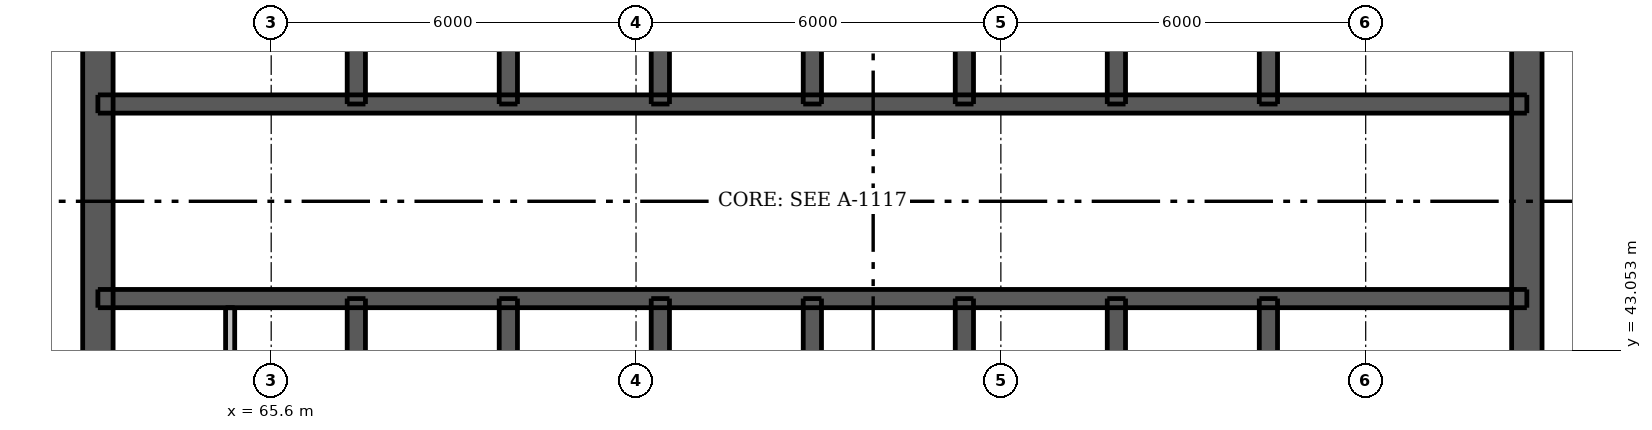
"""IFC4 building model, lengths in metres.
Left out: names, types, materials, properties, quantities, classifications, styles, units other than length and angle.
Written with IfcOpenShell. Run it as: python <this file> out.ifc"""

import sys

from ifc_helpers import new_model, si_unit, direction, frame, frame_2d, origin, place, context, subcontext, project, spatial, rectangle, extrude, element, fill, save


model = new_model("IFC4")
c1 = context("Model", 3, precision=1e-05, world=origin(), true_north=direction((0.0, 1.0)))
c2 = subcontext(c1, "Body", "Model", "MODEL_VIEW")
j1 = project(units=[si_unit("LENGTHUNIT", "METRE"), si_unit("PLANEANGLEUNIT", "RADIAN")], contexts=[c1])
p1 = place(None, origin())
s1 = spatial("IfcSite", under=j1, at=p1, CompositionType="ELEMENT")
p2 = place(p1, origin())
s2 = spatial("IfcBuilding", under=s1, at=p2, CompositionType="ELEMENT")
p3 = place(p2, frame((0.0, 0.0, 248.8)))
s3 = spatial("IfcBuildingStorey", under=s2, at=p3, CompositionType="ELEMENT", Elevation=248.8)
p4 = place(p3, frame((62.75, 33.5, 0.0), z_axis=(0.0, 0.0, 1.0), x_axis=(0.0, 1.0, 0.0)))
e1 = element("IfcWall", 1, at=p4, inside=s3, PredefinedType="SHEAR", context=c2, shape_type="SweptSolid", body=[
    extrude(rectangle(XDim=24.0, YDim=0.5, at=frame_2d((12.0, 0.0))), origin(), (0.0, 0.0, 1.0), 3.05),
])
p5 = place(p4, frame((11.2, 0.0, 0.0)))
e2 = element("IfcOpeningElement", 2, at=p5, cuts=e1, PredefinedType="OPENING", context=c2, shape_type="SweptSolid", body=[
    extrude(rectangle(XDim=1.6, YDim=2.1, at=frame_2d((0.8, 1.05))), frame((0.0, 0.26, 0.0), z_axis=(0.0, -1.0, 0.0), x_axis=(1.0, 0.0, 0.0)), (0.0, 0.0, 1.0), 0.52),
])
p6 = place(p3, frame((86.25, 33.5, 0.0), z_axis=(0.0, 0.0, 1.0), x_axis=(0.0, 1.0, 0.0)))
e3 = element("IfcWall", 3, at=p6, inside=s3, PredefinedType="SHEAR", context=c2, shape_type="SweptSolid", body=[
    extrude(rectangle(XDim=24.0, YDim=0.5, at=frame_2d((12.0, 0.0))), origin(), (0.0, 0.0, 1.0), 3.05),
])
p7 = place(p6, frame((11.2, 0.0, 0.0)))
e4 = element("IfcOpeningElement", 4, at=p7, cuts=e3, PredefinedType="OPENING", context=c2, shape_type="SweptSolid", body=[
    extrude(rectangle(XDim=1.6, YDim=2.1, at=frame_2d((0.8, 1.05))), frame((0.0, 0.26, 0.0), z_axis=(0.0, -1.0, 0.0), x_axis=(1.0, 0.0, 0.0)), (0.0, 0.0, 1.0), 0.52),
])
p8 = place(p3, frame((62.75, 43.9, 0.0), z_axis=(0.0, 0.0, 1.0), x_axis=(1.0, 0.0, 0.0)))
e5 = element("IfcWall", 5, at=p8, inside=s3, PredefinedType="SHEAR", context=c2, shape_type="SweptSolid", body=[
    extrude(rectangle(XDim=23.5, YDim=0.3, at=frame_2d((11.75, 0.0))), origin(), (0.0, 0.0, 1.0), 3.05),
])
p9 = place(p8, frame((0.762, 0.0, 0.0)))
e6 = element("IfcOpeningElement", 6, at=p9, cuts=e5, PredefinedType="OPENING", context=c2, shape_type="SweptSolid", body=[
    extrude(rectangle(XDim=0.9, YDim=2.1, at=frame_2d((0.45, 1.05))), frame((0.0, 0.16, 0.0), z_axis=(0.0, -1.0, 0.0), x_axis=(1.0, 0.0, 0.0)), (0.0, 0.0, 1.0), 0.32),
])
p10 = place(p8, frame((2.688, 0.0, 0.0)))
e7 = element("IfcOpeningElement", 7, at=p10, cuts=e5, PredefinedType="OPENING", context=c2, shape_type="SweptSolid", body=[
    extrude(rectangle(XDim=0.9, YDim=2.1, at=frame_2d((0.45, 1.05))), frame((0.0, 0.16, 0.0), z_axis=(0.0, -1.0, 0.0), x_axis=(1.0, 0.0, 0.0)), (0.0, 0.0, 1.0), 0.32),
])
p11 = place(p8, frame((20.875, 0.0, 0.0)))
e8 = element("IfcOpeningElement", 8, at=p11, cuts=e5, PredefinedType="OPENING", context=c2, shape_type="SweptSolid", body=[
    extrude(rectangle(XDim=0.9, YDim=2.1, at=frame_2d((0.45, 1.05))), frame((0.0, 0.16, 0.0), z_axis=(0.0, -1.0, 0.0), x_axis=(1.0, 0.0, 0.0)), (0.0, 0.0, 1.0), 0.32),
])
p12 = place(p8, frame((5.05, 0.0, 0.0)))
e9 = element("IfcOpeningElement", 9, at=p12, cuts=e5, PredefinedType="OPENING", context=c2, shape_type="SweptSolid", body=[
    extrude(rectangle(XDim=0.9, YDim=2.1, at=frame_2d((0.45, 1.05))), frame((0.0, 0.16, 0.0), z_axis=(0.0, -1.0, 0.0), x_axis=(1.0, 0.0, 0.0)), (0.0, 0.0, 1.0), 0.32),
])
p13 = place(p8, frame((7.55, 0.0, 0.0)))
e10 = element("IfcOpeningElement", 10, at=p13, cuts=e5, PredefinedType="OPENING", context=c2, shape_type="SweptSolid", body=[
    extrude(rectangle(XDim=0.9, YDim=2.1, at=frame_2d((0.45, 1.05))), frame((0.0, 0.16, 0.0), z_axis=(0.0, -1.0, 0.0), x_axis=(1.0, 0.0, 0.0)), (0.0, 0.0, 1.0), 0.32),
])
p14 = place(p8, frame((12.55, 0.0, 0.0)))
e11 = element("IfcOpeningElement", 11, at=p14, cuts=e5, PredefinedType="OPENING", context=c2, shape_type="SweptSolid", body=[
    extrude(rectangle(XDim=0.9, YDim=2.1, at=frame_2d((0.45, 1.05))), frame((0.0, 0.16, 0.0), z_axis=(0.0, -1.0, 0.0), x_axis=(1.0, 0.0, 0.0)), (0.0, 0.0, 1.0), 0.32),
])
p15 = place(p8, frame((15.05, 0.0, 0.0)))
e12 = element("IfcOpeningElement", 12, at=p15, cuts=e5, PredefinedType="OPENING", context=c2, shape_type="SweptSolid", body=[
    extrude(rectangle(XDim=0.9, YDim=2.1, at=frame_2d((0.45, 1.05))), frame((0.0, 0.16, 0.0), z_axis=(0.0, -1.0, 0.0), x_axis=(1.0, 0.0, 0.0)), (0.0, 0.0, 1.0), 0.32),
])
p16 = place(p3, frame((62.75, 47.1, 0.0), z_axis=(0.0, 0.0, 1.0), x_axis=(1.0, 0.0, 0.0)))
e13 = element("IfcWall", 13, at=p16, inside=s3, PredefinedType="SHEAR", context=c2, shape_type="SweptSolid", body=[
    extrude(rectangle(XDim=23.5, YDim=0.3, at=frame_2d((11.75, 0.0))), origin(), (0.0, 0.0, 1.0), 3.05),
])
p17 = place(p16, frame((1.725, 0.0, 0.0)))
e14 = element("IfcOpeningElement", 14, at=p17, cuts=e13, PredefinedType="OPENING", context=c2, shape_type="SweptSolid", body=[
    extrude(rectangle(XDim=0.9, YDim=2.1, at=frame_2d((0.45, 1.05))), frame((0.0, 0.16, 0.0), z_axis=(0.0, -1.0, 0.0), x_axis=(1.0, 0.0, 0.0)), (0.0, 0.0, 1.0), 0.32),
])
p18 = place(p16, frame((20.875, 0.0, 0.0)))
e15 = element("IfcOpeningElement", 15, at=p18, cuts=e13, PredefinedType="OPENING", context=c2, shape_type="SweptSolid", body=[
    extrude(rectangle(XDim=0.9, YDim=2.1, at=frame_2d((0.45, 1.05))), frame((0.0, 0.16, 0.0), z_axis=(0.0, -1.0, 0.0), x_axis=(1.0, 0.0, 0.0)), (0.0, 0.0, 1.0), 0.32),
])
p19 = place(p16, frame((4.95, 0.0, 0.0)))
e16 = element("IfcOpeningElement", 16, at=p19, cuts=e13, PredefinedType="OPENING", context=c2, shape_type="SweptSolid", body=[
    extrude(rectangle(XDim=1.1, YDim=2.1, at=frame_2d((0.55, 1.05))), frame((0.0, 0.16, 0.0), z_axis=(0.0, -1.0, 0.0), x_axis=(1.0, 0.0, 0.0)), (0.0, 0.0, 1.0), 0.32),
])
p20 = place(p16, frame((7.45, 0.0, 0.0)))
e17 = element("IfcOpeningElement", 17, at=p20, cuts=e13, PredefinedType="OPENING", context=c2, shape_type="SweptSolid", body=[
    extrude(rectangle(XDim=1.1, YDim=2.1, at=frame_2d((0.55, 1.05))), frame((0.0, 0.16, 0.0), z_axis=(0.0, -1.0, 0.0), x_axis=(1.0, 0.0, 0.0)), (0.0, 0.0, 1.0), 0.32),
])
p21 = place(p16, frame((9.95, 0.0, 0.0)))
e18 = element("IfcOpeningElement", 18, at=p21, cuts=e13, PredefinedType="OPENING", context=c2, shape_type="SweptSolid", body=[
    extrude(rectangle(XDim=1.1, YDim=2.1, at=frame_2d((0.55, 1.05))), frame((0.0, 0.16, 0.0), z_axis=(0.0, -1.0, 0.0), x_axis=(1.0, 0.0, 0.0)), (0.0, 0.0, 1.0), 0.32),
])
p22 = place(p16, frame((12.45, 0.0, 0.0)))
e19 = element("IfcOpeningElement", 19, at=p22, cuts=e13, PredefinedType="OPENING", context=c2, shape_type="SweptSolid", body=[
    extrude(rectangle(XDim=1.1, YDim=2.1, at=frame_2d((0.55, 1.05))), frame((0.0, 0.16, 0.0), z_axis=(0.0, -1.0, 0.0), x_axis=(1.0, 0.0, 0.0)), (0.0, 0.0, 1.0), 0.32),
])
p23 = place(p16, frame((14.95, 0.0, 0.0)))
e20 = element("IfcOpeningElement", 20, at=p23, cuts=e13, PredefinedType="OPENING", context=c2, shape_type="SweptSolid", body=[
    extrude(rectangle(XDim=1.1, YDim=2.1, at=frame_2d((0.55, 1.05))), frame((0.0, 0.16, 0.0), z_axis=(0.0, -1.0, 0.0), x_axis=(1.0, 0.0, 0.0)), (0.0, 0.0, 1.0), 0.32),
])
p24 = place(p16, frame((17.45, 0.0, 0.0)))
e21 = element("IfcOpeningElement", 21, at=p24, cuts=e13, PredefinedType="OPENING", context=c2, shape_type="SweptSolid", body=[
    extrude(rectangle(XDim=1.1, YDim=2.1, at=frame_2d((0.55, 1.05))), frame((0.0, 0.16, 0.0), z_axis=(0.0, -1.0, 0.0), x_axis=(1.0, 0.0, 0.0)), (0.0, 0.0, 1.0), 0.32),
])
p25 = place(p3, frame((67.0, 33.75, 0.0), z_axis=(0.0, 0.0, 1.0), x_axis=(0.0, 1.0, 0.0)))
e22 = element("IfcWall", 22, at=p25, inside=s3, PredefinedType="SHEAR", context=c2, shape_type="SweptSolid", body=[
    extrude(rectangle(XDim=10.15, YDim=0.3, at=frame_2d((5.075, 0.0))), origin(), (0.0, 0.0, 1.0), 3.05),
])
p26 = place(p25, frame((0.45, 0.0, 0.0)))
e23 = element("IfcOpeningElement", 23, at=p26, cuts=e22, PredefinedType="OPENING", context=c2, shape_type="SweptSolid", body=[
    extrude(rectangle(XDim=1.1, YDim=2.1, at=frame_2d((0.55, 1.05))), frame((0.0, 0.16, 0.0), z_axis=(0.0, -1.0, 0.0), x_axis=(1.0, 0.0, 0.0)), (0.0, 0.0, 1.0), 0.32),
])
for number, where, z_axis, x_axis in (
    (24, (67.0, 47.1, 0.0), (0.0, 0.0, 1.0), (0.0, 1.0, 0.0)),
    (25, (82.0, 33.75, 0.0), (0.0, 0.0, 1.0), (0.0, 1.0, 0.0)),
    (26, (82.0, 47.1, 0.0), (0.0, 0.0, 1.0), (0.0, 1.0, 0.0)),
):
    element("IfcWall", number, at=place(p3, frame(where, z_axis=z_axis, x_axis=x_axis)), inside=s3, PredefinedType="SHEAR", context=c2, shape_type="SweptSolid", body=[
        extrude(rectangle(XDim=10.15, YDim=0.3, at=frame_2d((5.075, 0.0))), origin(), (0.0, 0.0, 1.0), 3.05),
    ])
for number, where, z_axis, x_axis in (
    (27, (69.5, 41.0, 0.0), (0.0, 0.0, 1.0), (0.0, 1.0, 0.0)),
    (28, (69.5, 47.1, 0.0), (0.0, 0.0, 1.0), (0.0, 1.0, 0.0)),
    (29, (72.0, 41.0, 0.0), (0.0, 0.0, 1.0), (0.0, 1.0, 0.0)),
    (30, (72.0, 47.1, 0.0), (0.0, 0.0, 1.0), (0.0, 1.0, 0.0)),
    (31, (74.5, 41.0, 0.0), (0.0, 0.0, 1.0), (0.0, 1.0, 0.0)),
    (32, (74.5, 47.1, 0.0), (0.0, 0.0, 1.0), (0.0, 1.0, 0.0)),
    (33, (77.0, 41.0, 0.0), (0.0, 0.0, 1.0), (0.0, 1.0, 0.0)),
    (34, (77.0, 47.1, 0.0), (0.0, 0.0, 1.0), (0.0, 1.0, 0.0)),
    (35, (79.5, 41.0, 0.0), (0.0, 0.0, 1.0), (0.0, 1.0, 0.0)),
    (36, (79.5, 47.1, 0.0), (0.0, 0.0, 1.0), (0.0, 1.0, 0.0)),
):
    element("IfcWall", number, at=place(p3, frame(where, z_axis=z_axis, x_axis=x_axis)), inside=s3, PredefinedType="SHEAR", context=c2, shape_type="SweptSolid", body=[
        extrude(rectangle(XDim=2.9, YDim=0.3, at=frame_2d((1.45, 0.0))), origin(), (0.0, 0.0, 1.0), 3.05),
    ])
p27 = place(p3, frame((64.925, 41.15, 0.0), z_axis=(0.0, 0.0, 1.0), x_axis=(0.0, 1.0, 0.0)))
e37 = element("IfcWall", 37, at=p27, inside=s3, PredefinedType="PLUMBINGWALL", context=c2, shape_type="SweptSolid", body=[
    extrude(rectangle(XDim=2.6, YDim=0.15, at=frame_2d((1.3, 0.0))), origin(), (0.0, 0.0, 1.0), 3.05),
])
p28 = place(p5, origin())
e38 = element("IfcDoor", 38, at=p28, inside=s3, OperationType="DOUBLE_DOOR_SINGLE_SWING", PredefinedType="DOOR", context=c2, shape_type="SweptSolid", body=[
    extrude(rectangle(XDim=1.6, YDim=2.1, at=frame_2d((0.8, 1.05))), frame((0.0, -0.188, 0.0), z_axis=(0.0, -1.0, 0.0), x_axis=(1.0, 0.0, 0.0)), (0.0, 0.0, 1.0), 0.05),
])
fill(e2, e38)
p29 = place(p7, origin())
e39 = element("IfcDoor", 39, at=p29, inside=s3, OperationType="DOUBLE_DOOR_SINGLE_SWING", PredefinedType="DOOR", context=c2, shape_type="SweptSolid", body=[
    extrude(rectangle(XDim=1.6, YDim=2.1, at=frame_2d((0.8, 1.05))), frame((0.0, 0.237, 0.0), z_axis=(0.0, -1.0, 0.0), x_axis=(1.0, 0.0, 0.0)), (0.0, 0.0, 1.0), 0.05),
])
fill(e4, e39)
p30 = place(p9, origin())
e40 = element("IfcDoor", 40, at=p30, inside=s3, OperationType="SINGLE_SWING_LEFT", PredefinedType="DOOR", context=c2, shape_type="SweptSolid", body=[
    extrude(rectangle(XDim=0.9, YDim=2.1, at=frame_2d((0.45, 1.05))), frame((0.0, -0.087, 0.0), z_axis=(0.0, -1.0, 0.0), x_axis=(1.0, 0.0, 0.0)), (0.0, 0.0, 1.0), 0.05),
])
fill(e6, e40)
p31 = place(p10, origin())
e41 = element("IfcDoor", 41, at=p31, inside=s3, OperationType="SINGLE_SWING_RIGHT", PredefinedType="DOOR", context=c2, shape_type="SweptSolid", body=[
    extrude(rectangle(XDim=0.9, YDim=2.1, at=frame_2d((0.45, 1.05))), frame((0.0, -0.087, 0.0), z_axis=(0.0, -1.0, 0.0), x_axis=(1.0, 0.0, 0.0)), (0.0, 0.0, 1.0), 0.05),
])
fill(e7, e41)
p32 = place(p11, origin())
e42 = element("IfcDoor", 42, at=p32, inside=s3, OperationType="SINGLE_SWING_LEFT", PredefinedType="DOOR", context=c2, shape_type="SweptSolid", body=[
    extrude(rectangle(XDim=0.9, YDim=2.1, at=frame_2d((0.45, 1.05))), frame((0.0, -0.087, 0.0), z_axis=(0.0, -1.0, 0.0), x_axis=(1.0, 0.0, 0.0)), (0.0, 0.0, 1.0), 0.05),
])
fill(e8, e42)
p33 = place(p17, origin())
e43 = element("IfcDoor", 43, at=p33, inside=s3, OperationType="SINGLE_SWING_LEFT", PredefinedType="DOOR", context=c2, shape_type="SweptSolid", body=[
    extrude(rectangle(XDim=0.9, YDim=2.1, at=frame_2d((0.45, 1.05))), frame((0.0, 0.138, 0.0), z_axis=(0.0, -1.0, 0.0), x_axis=(1.0, 0.0, 0.0)), (0.0, 0.0, 1.0), 0.05),
])
fill(e14, e43)
p34 = place(p18, origin())
e44 = element("IfcDoor", 44, at=p34, inside=s3, OperationType="SINGLE_SWING_LEFT", PredefinedType="DOOR", context=c2, shape_type="SweptSolid", body=[
    extrude(rectangle(XDim=0.9, YDim=2.1, at=frame_2d((0.45, 1.05))), frame((0.0, 0.138, 0.0), z_axis=(0.0, -1.0, 0.0), x_axis=(1.0, 0.0, 0.0)), (0.0, 0.0, 1.0), 0.05),
])
fill(e15, e44)
p35 = place(p12, origin())
e45 = element("IfcDoor", 45, at=p35, inside=s3, OperationType="SINGLE_SWING_RIGHT", PredefinedType="DOOR", context=c2, shape_type="SweptSolid", body=[
    extrude(rectangle(XDim=0.9, YDim=2.1, at=frame_2d((0.45, 1.05))), frame((0.0, -0.087, 0.0), z_axis=(0.0, -1.0, 0.0), x_axis=(1.0, 0.0, 0.0)), (0.0, 0.0, 1.0), 0.05),
])
fill(e9, e45)
p36 = place(p13, origin())
e46 = element("IfcDoor", 46, at=p36, inside=s3, OperationType="SINGLE_SWING_LEFT", PredefinedType="DOOR", context=c2, shape_type="SweptSolid", body=[
    extrude(rectangle(XDim=0.9, YDim=2.1, at=frame_2d((0.45, 1.05))), frame((0.0, -0.087, 0.0), z_axis=(0.0, -1.0, 0.0), x_axis=(1.0, 0.0, 0.0)), (0.0, 0.0, 1.0), 0.05),
])
fill(e10, e46)
p37 = place(p14, origin())
e47 = element("IfcDoor", 47, at=p37, inside=s3, OperationType="SINGLE_SWING_LEFT", PredefinedType="DOOR", context=c2, shape_type="SweptSolid", body=[
    extrude(rectangle(XDim=0.9, YDim=2.1, at=frame_2d((0.45, 1.05))), frame((0.0, -0.087, 0.0), z_axis=(0.0, -1.0, 0.0), x_axis=(1.0, 0.0, 0.0)), (0.0, 0.0, 1.0), 0.05),
])
fill(e11, e47)
p38 = place(p15, origin())
e48 = element("IfcDoor", 48, at=p38, inside=s3, OperationType="SINGLE_SWING_RIGHT", PredefinedType="DOOR", context=c2, shape_type="SweptSolid", body=[
    extrude(rectangle(XDim=0.9, YDim=2.1, at=frame_2d((0.45, 1.05))), frame((0.0, -0.087, 0.0), z_axis=(0.0, -1.0, 0.0), x_axis=(1.0, 0.0, 0.0)), (0.0, 0.0, 1.0), 0.05),
])
fill(e12, e48)
p39 = place(p19, origin())
e49 = element("IfcDoor", 49, at=p39, inside=s3, OperationType="DOUBLE_DOOR_SLIDING", PredefinedType="DOOR", context=c2, shape_type="SweptSolid", body=[
    extrude(rectangle(XDim=1.1, YDim=2.1, at=frame_2d((0.55, 1.05))), frame((0.0, 0.025, 0.0), z_axis=(0.0, -1.0, 0.0), x_axis=(1.0, 0.0, 0.0)), (0.0, 0.0, 1.0), 0.05),
])
fill(e16, e49)
p40 = place(p20, origin())
e50 = element("IfcDoor", 50, at=p40, inside=s3, OperationType="DOUBLE_DOOR_SLIDING", PredefinedType="DOOR", context=c2, shape_type="SweptSolid", body=[
    extrude(rectangle(XDim=1.1, YDim=2.1, at=frame_2d((0.55, 1.05))), frame((0.0, 0.025, 0.0), z_axis=(0.0, -1.0, 0.0), x_axis=(1.0, 0.0, 0.0)), (0.0, 0.0, 1.0), 0.05),
])
fill(e17, e50)
p41 = place(p21, origin())
e51 = element("IfcDoor", 51, at=p41, inside=s3, OperationType="DOUBLE_DOOR_SLIDING", PredefinedType="DOOR", context=c2, shape_type="SweptSolid", body=[
    extrude(rectangle(XDim=1.1, YDim=2.1, at=frame_2d((0.55, 1.05))), frame((0.0, 0.025, 0.0), z_axis=(0.0, -1.0, 0.0), x_axis=(1.0, 0.0, 0.0)), (0.0, 0.0, 1.0), 0.05),
])
fill(e18, e51)
p42 = place(p22, origin())
e52 = element("IfcDoor", 52, at=p42, inside=s3, OperationType="DOUBLE_DOOR_SLIDING", PredefinedType="DOOR", context=c2, shape_type="SweptSolid", body=[
    extrude(rectangle(XDim=1.1, YDim=2.1, at=frame_2d((0.55, 1.05))), frame((0.0, 0.025, 0.0), z_axis=(0.0, -1.0, 0.0), x_axis=(1.0, 0.0, 0.0)), (0.0, 0.0, 1.0), 0.05),
])
fill(e19, e52)
p43 = place(p23, origin())
e53 = element("IfcDoor", 53, at=p43, inside=s3, OperationType="DOUBLE_DOOR_SLIDING", PredefinedType="DOOR", context=c2, shape_type="SweptSolid", body=[
    extrude(rectangle(XDim=1.1, YDim=2.1, at=frame_2d((0.55, 1.05))), frame((0.0, 0.025, 0.0), z_axis=(0.0, -1.0, 0.0), x_axis=(1.0, 0.0, 0.0)), (0.0, 0.0, 1.0), 0.05),
])
fill(e20, e53)
p44 = place(p24, origin())
e54 = element("IfcDoor", 54, at=p44, inside=s3, OperationType="DOUBLE_DOOR_SLIDING", PredefinedType="DOOR", context=c2, shape_type="SweptSolid", body=[
    extrude(rectangle(XDim=1.1, YDim=2.1, at=frame_2d((0.55, 1.05))), frame((0.0, 0.025, 0.0), z_axis=(0.0, -1.0, 0.0), x_axis=(1.0, 0.0, 0.0)), (0.0, 0.0, 1.0), 0.05),
])
fill(e21, e54)
save(model, sys.argv[1])
